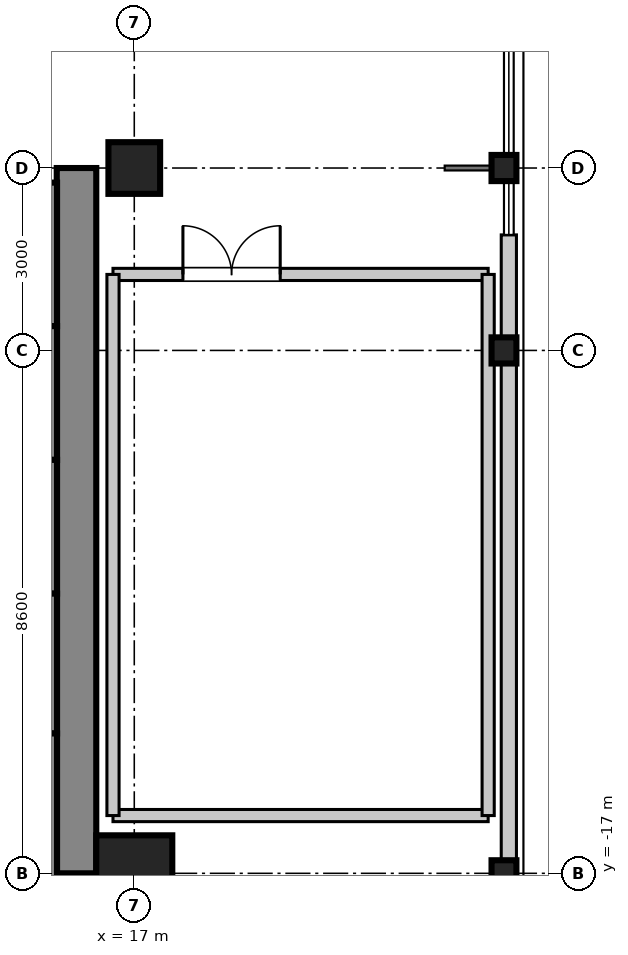
"""IFC4 building model, lengths in metres.
Left out: names, types, materials, properties, quantities, classifications, styles, units other than length and angle.
Written with IfcOpenShell. Run it as: python <this file> out.ifc"""

import sys

from ifc_helpers import new_model, si_unit, direction, frame, frame_2d, origin, origin_2d, place, context, subcontext, project, spatial, rectangle, i_section, extrude, source, transform, mapped, element, fill, save


model = new_model("IFC4")
c1 = context("Model", 3, precision=1e-05, world=origin(), true_north=direction((0.0, 1.0)))
c2 = subcontext(c1, "Body", "Model", "MODEL_VIEW")
j1 = project(units=[si_unit("LENGTHUNIT", "METRE"), si_unit("PLANEANGLEUNIT", "RADIAN")], contexts=[c1])
p1 = place(None, origin())
s1 = spatial("IfcSite", under=j1, at=p1, CompositionType="ELEMENT")
p2 = place(p1, origin())
s2 = spatial("IfcBuilding", under=s1, at=p2, CompositionType="ELEMENT")
p3 = place(p2, frame((0.0, 0.0, 144.2)))
s3 = spatial("IfcBuildingStorey", under=s2, at=p3, CompositionType="ELEMENT", Elevation=144.2)
m1 = source(origin(), c2, "Body", "SweptSolid", [
    extrude(rectangle(XDim=1.25, YDim=1.25, at=origin_2d()), origin(), (0.0, 0.0, 1.0), 4.755),
])
p4 = place(p3, frame((17.0, -17.0, 0.0), z_axis=(0.0, 0.0, 1.0), x_axis=(1.0, 0.0, 0.0)))
e1 = element("IfcColumn", 1, at=p4, inside=s3, PredefinedType="COLUMN", context=c2, shape_type="MappedRepresentation", body=[
    mapped(m1, transform((0.0, 0.0, 0.0), scale=1.0)),
])
m2 = source(origin(), c2, "Body", "SweptSolid", [
    extrude(rectangle(XDim=0.85, YDim=0.85, at=origin_2d()), origin(), (0.0, 0.0, 1.0), 4.755),
])
p5 = place(p3, frame((17.0, -5.4, 0.0), z_axis=(0.0, 0.0, 1.0), x_axis=(1.0, 0.0, 0.0)))
e2 = element("IfcColumn", 2, at=p5, inside=s3, PredefinedType="PILASTER", context=c2, shape_type="MappedRepresentation", body=[
    mapped(m2, transform((0.0, 0.0, 0.0), scale=1.0)),
])
m3 = source(origin(), c2, "Body", "SweptSolid", [
    extrude(i_section(OverallWidth=0.409, OverallDepth=0.43, WebThickness=0.021, FlangeThickness=0.034, at=origin_2d()), origin(), (0.0, 0.0, 1.0), 4.694),
])
for number, where, z_axis, x_axis in (
    (3, (23.08, -17.0, 0.0), (-0.128, 0.0, 0.992), (0.0, -1.0, 0.0)),
    (4, (23.08, -8.4, 0.0), (-0.128, 0.0, 0.992), (0.0, -1.0, 0.0)),
    (5, (23.08, -5.4, 0.0), (-0.128, 0.0, 0.992), (0.0, -1.0, 0.0)),
):
    element("IfcColumn", number, at=place(p3, frame(where, z_axis=z_axis, x_axis=x_axis)), inside=s3, PredefinedType="COLUMN", context=c2, shape_type="MappedRepresentation", body=[
        mapped(m3, transform((0.0, 0.0, 0.0), scale=1.0)),
    ])
m4 = source(origin(), c2, "Body", "SweptSolid", [
    extrude(rectangle(XDim=11.6, YDim=0.65, at=frame_2d((5.8, 0.0))), origin(), (0.0, 0.0, 1.0), 4.54),
])
p6 = place(p3, frame((16.05, -17.0, 0.0), z_axis=(0.0, 0.0, 1.0), x_axis=(0.0, 1.0, 0.0)))
e6 = element("IfcWall", 6, at=p6, inside=s3, PredefinedType="SHEAR", context=c2, shape_type="MappedRepresentation", body=[
    mapped(m4, transform((0.0, 0.0, 0.0), scale=1.0)),
])
m5 = source(origin(), c2, "Body", "SweptSolid", [
    extrude(rectangle(XDim=2.36, YDim=0.22, at=frame_2d((1.18, 0.0))), origin(), (0.0, 0.0, 1.0), 4.54),
])
p7 = place(p3, frame((15.62, -8.0, 0.0), z_axis=(0.0, 0.0, 1.0), x_axis=(0.0, 1.0, 0.0)))
e7 = element("IfcWall", 7, at=p7, inside=s3, PredefinedType="SHEAR", context=c2, shape_type="MappedRepresentation", body=[
    mapped(m5, transform((0.0, 0.0, 0.0), scale=1.0)),
])
m6 = source(origin(), c2, "Body", "SweptSolid", [
    extrude(rectangle(XDim=2.2, YDim=0.22, at=frame_2d((1.1, 0.0))), origin(), (0.0, 0.0, 1.0), 4.54),
])
for number, where, z_axis, x_axis in (
    (8, (15.62, -10.2, 0.0), (0.0, 0.0, 1.0), (0.0, 1.0, 0.0)),
    (9, (15.62, -12.4, 0.0), (0.0, 0.0, 1.0), (0.0, 1.0, 0.0)),
):
    element("IfcWall", number, at=place(p3, frame(where, z_axis=z_axis, x_axis=x_axis)), inside=s3, PredefinedType="SHEAR", context=c2, shape_type="MappedRepresentation", body=[
        mapped(m6, transform((0.0, 0.0, 0.0), scale=1.0)),
    ])
m7 = source(origin(), c2, "Body", "SweptSolid", [
    extrude(rectangle(XDim=2.3, YDim=0.22, at=frame_2d((1.15, 0.0))), origin(), (0.0, 0.0, 1.0), 4.54),
])
p8 = place(p3, frame((15.62, -14.7, 0.0), z_axis=(0.0, 0.0, 1.0), x_axis=(0.0, 1.0, 0.0)))
e10 = element("IfcWall", 10, at=p8, inside=s3, PredefinedType="SHEAR", context=c2, shape_type="MappedRepresentation", body=[
    mapped(m7, transform((0.0, 0.0, 0.0), scale=1.0)),
])
m8 = source(origin(), c2, "Body", "SweptSolid", [
    extrude(rectangle(XDim=2.61, YDim=0.22, at=frame_2d((1.305, 0.0))), origin(), (0.0, 0.0, 1.0), 4.54),
])
p9 = place(p3, frame((15.62, -17.31, 0.0), z_axis=(0.0, 0.0, 1.0), x_axis=(0.0, 1.0, 0.0)))
e11 = element("IfcWall", 11, at=p9, inside=s3, PredefinedType="SHEAR", context=c2, shape_type="MappedRepresentation", body=[
    mapped(m8, transform((0.0, 0.0, 0.0), scale=1.0)),
])
m9 = source(origin(), c2, "Body", "SweptSolid", [
    extrude(rectangle(XDim=13.86, YDim=0.25, at=frame_2d((6.93, 0.0))), origin(), (0.0, 0.0, 1.0), 4.02),
])
p10 = place(p3, frame((23.16, -20.36, 0.0), z_axis=(0.0, 0.0, 1.0), x_axis=(0.0, 1.0, 0.0)))
e12 = element("IfcWall", 12, at=p10, inside=s3, PredefinedType="STANDARD", context=c2, shape_type="MappedRepresentation", body=[
    mapped(m9, transform((0.0, 0.0, 0.0), scale=1.0)),
])
m10 = source(origin(), c2, "Body", "SweptSolid", [
    extrude(rectangle(XDim=6.17, YDim=0.2, at=frame_2d((3.085, 0.0))), origin(), (0.0, 0.0, 1.0), 3.4),
])
p11 = place(p3, frame((16.65, -16.05, 0.0), z_axis=(0.0, 0.0, 1.0), x_axis=(1.0, 0.0, 0.0)))
e13 = element("IfcWall", 13, at=p11, inside=s3, PredefinedType="PARTITIONING", context=c2, shape_type="MappedRepresentation", body=[
    mapped(m10, transform((0.0, 0.0, 0.0), scale=1.0)),
])
p12 = place(p3, frame((16.65, -7.15, 0.0), z_axis=(0.0, 0.0, 1.0), x_axis=(1.0, 0.0, 0.0)))
e14 = element("IfcWall", 14, at=p12, inside=s3, PredefinedType="PARTITIONING", context=c2, shape_type="MappedRepresentation", body=[
    mapped(m10, transform((0.0, 0.0, 0.0), scale=1.0)),
])
p13 = place(p12, frame((1.15, 0.0, 0.0)))
e15 = element("IfcOpeningElement", 15, at=p13, cuts=e14, PredefinedType="OPENING", context=c2, shape_type="SweptSolid", body=[
    extrude(rectangle(XDim=1.6, YDim=2.15, at=frame_2d((0.8, 1.075))), frame((0.0, 0.11, 0.0), z_axis=(0.0, -1.0, 0.0), x_axis=(1.0, 0.0, 0.0)), (0.0, 0.0, 1.0), 0.22),
])
m11 = source(origin(), c2, "Body", "SweptSolid", [
    extrude(rectangle(XDim=8.9, YDim=0.2, at=frame_2d((4.45, 0.0))), origin(), (0.0, 0.0, 1.0), 3.4),
])
for number, where, z_axis, x_axis in (
    (16, (16.65, -16.05, 0.0), (0.0, 0.0, 1.0), (0.0, 1.0, 0.0)),
    (17, (22.82, -16.05, 0.0), (0.0, 0.0, 1.0), (0.0, 1.0, 0.0)),
):
    element("IfcWall", number, at=place(p3, frame(where, z_axis=z_axis, x_axis=x_axis)), inside=s3, PredefinedType="PARTITIONING", context=c2, shape_type="MappedRepresentation", body=[
        mapped(m11, transform((0.0, 0.0, 0.0), scale=1.0)),
    ])
m12 = source(origin(), c2, "Body", "SweptSolid", [
    extrude(rectangle(XDim=1.6, YDim=2.15, at=frame_2d((0.8, 1.075))), frame((0.0, 0.025, 0.0), z_axis=(0.0, -1.0, 0.0), x_axis=(1.0, 0.0, 0.0)), (0.0, 0.0, 1.0), 0.05),
])
p14 = place(p13, frame((1.6, 0.0, 0.0), z_axis=(0.0, 0.0, 1.0), x_axis=(-1.0, 0.0, 0.0)))
e18 = element("IfcDoor", 18, at=p14, inside=s3, OperationType="DOUBLE_DOOR_SINGLE_SWING", PredefinedType="DOOR", context=c2, shape_type="MappedRepresentation", body=[
    mapped(m12, transform((0.0, 0.0, 0.0), scale=1.0)),
])
fill(e15, e18)
save(model, sys.argv[1])
